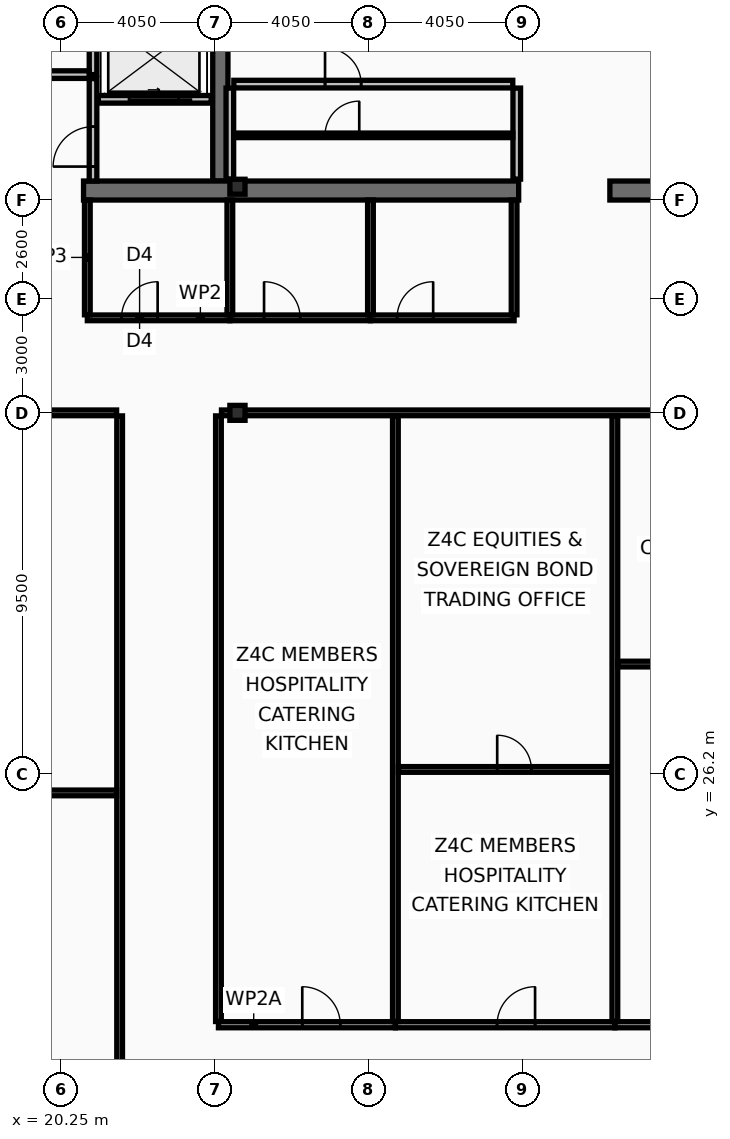
"""IFC4 building model, lengths in metres.
Left out: names, types, materials, properties, quantities, classifications, styles, units other than length and angle.
Written with IfcOpenShell. Run it as: python <this file> out.ifc"""

import sys

from ifc_helpers import new_model, si_unit, direction, frame, frame_2d, origin, origin_2d, place, context, subcontext, project, spatial, rectangle, i_section, extrude, element, fill, save


model = new_model("IFC4")
c1 = context("Model", 3, precision=1e-05, world=origin(), true_north=direction((0.0, 1.0)))
c2 = subcontext(c1, "Body", "Model", "MODEL_VIEW")
j1 = project(units=[si_unit("LENGTHUNIT", "METRE"), si_unit("PLANEANGLEUNIT", "RADIAN")], contexts=[c1])
p1 = place(None, origin())
s1 = spatial("IfcSite", under=j1, at=p1, CompositionType="ELEMENT")
p2 = place(p1, origin())
s2 = spatial("IfcBuilding", under=s1, at=p2, CompositionType="ELEMENT")
p3 = place(p2, frame((0.0, 0.0, 318.2)))
s3 = spatial("IfcBuildingStorey", under=s2, at=p3, CompositionType="ELEMENT", Elevation=318.2)
p4 = place(p3, frame((24.45, 41.8, 0.0), z_axis=(0.0, 0.0, 1.0), x_axis=(0.0, 1.0, 0.0)))
e1 = element("IfcWall", 1, at=p4, inside=s3, PredefinedType="SHEAR", context=c2, shape_type="SweptSolid", body=[
    extrude(rectangle(XDim=11.4, YDim=0.4, at=frame_2d((5.7, 0.0))), origin(), (0.0, 0.0, 1.0), 3.44),
])
p5 = place(p3, frame((32.3, 41.55, 0.0), z_axis=(0.0, 0.0, 1.0), x_axis=(-1.0, 0.0, 0.0)))
e2 = element("IfcWall", 2, at=p5, inside=s3, PredefinedType="SHEAR", context=c2, shape_type="SweptSolid", body=[
    extrude(rectangle(XDim=11.45, YDim=0.5, at=frame_2d((5.725, 0.0))), origin(), (0.0, 0.0, 1.0), 3.44),
])
p6 = place(p3, frame((38.45, 41.55, 0.0), z_axis=(0.0, 0.0, 1.0), x_axis=(-1.0, 0.0, 0.0)))
e3 = element("IfcWall", 3, at=p6, inside=s3, PredefinedType="SHEAR", context=c2, shape_type="SweptSolid", body=[
    extrude(rectangle(XDim=3.75, YDim=0.5, at=frame_2d((1.875, 0.0))), origin(), (0.0, 0.0, 1.0), 3.44),
])
for number, where, z_axis, x_axis in (
    (4, (24.9, 35.7, 0.0), (0.0, 0.0, 1.0), (1.0, 0.0, 0.0)),
    (5, (24.9, 41.65, 0.0), (0.0, 0.0, 1.0), (1.0, 0.0, 0.0)),
):
    element("IfcColumn", number, at=place(p3, frame(where, z_axis=z_axis, x_axis=x_axis)), inside=s3, PredefinedType="COLUMN", context=c2, shape_type="SweptSolid", body=[
        extrude(i_section(OverallWidth=0.399, OverallDepth=0.393, WebThickness=0.023, FlangeThickness=0.037, at=origin_2d()), origin(), (0.0, 0.0, 1.0), 3.6),
    ])
p7 = place(p3, frame((24.21, 43.95, 0.0), z_axis=(0.0, 0.0, 1.0), x_axis=(-1.0, 0.0, 0.0)))
e6 = element("IfcWall", 6, at=p7, inside=s3, PredefinedType="PARTITIONING", context=c2, shape_type="SweptSolid", body=[
    extrude(rectangle(XDim=2.97, YDim=0.2, at=frame_2d((1.485, 0.0))), origin(), (0.0, 0.0, 1.0), 3.44),
])
p8 = place(p7, frame((0.86, 0.0, 0.0)))
e7 = element("IfcOpeningElement", 7, at=p8, cuts=e6, PredefinedType="OPENING", context=c2, shape_type="SweptSolid", body=[
    extrude(rectangle(XDim=1.3, YDim=2.18, at=frame_2d((0.65, 1.09))), frame((0.0, 0.11, 0.0), z_axis=(0.0, -1.0, 0.0), x_axis=(1.0, 0.0, 0.0)), (0.0, 0.0, 1.0), 0.22),
])
p9 = place(p3, frame((21.1, 44.6, 0.0), z_axis=(0.0, 0.0, 1.0), x_axis=(0.0, 1.0, 0.0)))
e8 = element("IfcWall", 8, at=p9, inside=s3, PredefinedType="PARTITIONING", context=c2, shape_type="SweptSolid", body=[
    extrude(rectangle(XDim=4.3, YDim=0.2, at=frame_2d((2.15, 0.0))), origin(), (0.0, 0.0, 1.0), 3.44),
])
p10 = place(p3, frame((16.7, 44.6, 0.0), z_axis=(0.0, 0.0, 1.0), x_axis=(1.0, 0.0, 0.0)))
e9 = element("IfcWall", 9, at=p10, inside=s3, PredefinedType="PARTITIONING", context=c2, shape_type="SweptSolid", body=[
    extrude(rectangle(XDim=4.3, YDim=0.2, at=frame_2d((2.15, 0.0))), origin(), (0.0, 0.0, 1.0), 3.44),
])
p11 = place(p10, frame((1.25, 0.0, 0.0)))
e10 = element("IfcOpeningElement", 10, at=p11, cuts=e9, PredefinedType="OPENING", context=c2, shape_type="SweptSolid", body=[
    extrude(rectangle(XDim=1.05, YDim=2.15, at=frame_2d((0.525, 1.075))), frame((0.0, 0.11, 0.0), z_axis=(0.0, -1.0, 0.0), x_axis=(1.0, 0.0, 0.0)), (0.0, 0.0, 1.0), 0.22),
])
p12 = place(p3, frame((21.1, 41.8, 0.0), z_axis=(0.0, 0.0, 1.0), x_axis=(0.0, 1.0, 0.0)))
e11 = element("IfcWall", 11, at=p12, inside=s3, PredefinedType="PARTITIONING", context=c2, shape_type="SweptSolid", body=[
    extrude(rectangle(XDim=2.695, YDim=0.2, at=frame_2d((1.348, 0.0))), origin(), (0.0, 0.0, 1.0), 3.44),
])
p13 = place(p12, frame((0.38, 0.0, 0.0)))
e12 = element("IfcOpeningElement", 12, at=p13, cuts=e11, PredefinedType="OPENING", context=c2, shape_type="SweptSolid", body=[
    extrude(rectangle(XDim=1.05, YDim=2.15, at=frame_2d((0.525, 1.075))), frame((0.0, 0.11, 0.0), z_axis=(0.0, -1.0, 0.0), x_axis=(1.0, 0.0, 0.0)), (0.0, 0.0, 1.0), 0.22),
])
for number, where, z_axis, x_axis in (
    (13, (24.7, 41.85, 0.0), (0.0, 0.0, 1.0), (0.0, 1.0, 0.0)),
    (14, (32.25, 41.85, 0.0), (0.0, 0.0, 1.0), (0.0, 1.0, 0.0)),
):
    element("IfcWall", number, at=place(p3, frame(where, z_axis=z_axis, x_axis=x_axis)), inside=s3, PredefinedType="PARTITIONING", context=c2, shape_type="SweptSolid", body=[
        extrude(rectangle(XDim=2.395, YDim=0.2, at=frame_2d((1.198, 0.0))), origin(), (0.0, 0.0, 1.0), 3.44),
    ])
p14 = place(p3, frame((24.805, 43.002, 0.0), z_axis=(0.0, 0.0, 1.0), x_axis=(1.0, 0.0, 0.0)))
e15 = element("IfcWall", 15, at=p14, inside=s3, PredefinedType="PARTITIONING", context=c2, shape_type="SweptSolid", body=[
    extrude(rectangle(XDim=7.34, YDim=0.12, at=frame_2d((3.67, 0.0))), origin(), (0.0, 0.0, 1.0), 3.44),
])
p15 = place(p14, frame((2.4, 0.0, 0.0)))
e16 = element("IfcOpeningElement", 16, at=p15, cuts=e15, PredefinedType="OPENING", context=c2, shape_type="SweptSolid", body=[
    extrude(rectangle(XDim=0.9, YDim=2.05, at=frame_2d((0.45, 1.025))), frame((0.0, 0.07, 0.0), z_axis=(0.0, -1.0, 0.0), x_axis=(1.0, 0.0, 0.0)), (0.0, 0.0, 1.0), 0.14),
])
p16 = place(p3, frame((24.805, 44.35, 0.0), z_axis=(0.0, 0.0, 1.0), x_axis=(1.0, 0.0, 0.0)))
e17 = element("IfcWall", 17, at=p16, inside=s3, PredefinedType="PARTITIONING", context=c2, shape_type="SweptSolid", body=[
    extrude(rectangle(XDim=7.34, YDim=0.2, at=frame_2d((3.67, 0.0))), origin(), (0.0, 0.0, 1.0), 3.44),
])
p17 = place(p16, frame((2.4, 0.0, 0.0)))
e18 = element("IfcOpeningElement", 18, at=p17, cuts=e17, PredefinedType="OPENING", context=c2, shape_type="SweptSolid", body=[
    extrude(rectangle(XDim=0.95, YDim=2.1, at=frame_2d((0.475, 1.05))), frame((0.0, 0.11, 0.0), z_axis=(0.0, -1.0, 0.0), x_axis=(1.0, 0.0, 0.0)), (0.0, 0.0, 1.0), 0.22),
])
p18 = place(p3, frame((20.95, 38.2, 0.0), z_axis=(0.0, 0.0, 1.0), x_axis=(1.0, 0.0, 0.0)))
e19 = element("IfcWall", 19, at=p18, inside=s3, PredefinedType="PARTITIONING", context=c2, shape_type="SweptSolid", body=[
    extrude(rectangle(XDim=3.75, YDim=0.15, at=frame_2d((1.875, 0.0))), origin(), (0.0, 0.0, 1.0), 2.83),
])
p19 = place(p18, frame((0.9, 0.0, 0.0)))
e20 = element("IfcOpeningElement", 20, at=p19, cuts=e19, PredefinedType="OPENING", context=c2, shape_type="SweptSolid", body=[
    extrude(rectangle(XDim=0.95, YDim=2.05, at=frame_2d((0.475, 1.025))), frame((0.0, 0.085, 0.0), z_axis=(0.0, -1.0, 0.0), x_axis=(1.0, 0.0, 0.0)), (0.0, 0.0, 1.0), 0.17),
])
p20 = place(p3, frame((24.7, 38.2, 0.0), z_axis=(0.0, 0.0, 1.0), x_axis=(1.0, 0.0, 0.0)))
e21 = element("IfcWall", 21, at=p20, inside=s3, PredefinedType="PARTITIONING", context=c2, shape_type="SweptSolid", body=[
    extrude(rectangle(XDim=3.7, YDim=0.15, at=frame_2d((1.85, 0.0))), origin(), (0.0, 0.0, 1.0), 2.83),
])
p21 = place(p20, frame((0.9, 0.0, 0.0)))
e22 = element("IfcOpeningElement", 22, at=p21, cuts=e21, PredefinedType="OPENING", context=c2, shape_type="SweptSolid", body=[
    extrude(rectangle(XDim=0.95, YDim=2.05, at=frame_2d((0.475, 1.025))), frame((0.0, 0.085, 0.0), z_axis=(0.0, -1.0, 0.0), x_axis=(1.0, 0.0, 0.0)), (0.0, 0.0, 1.0), 0.17),
])
p22 = place(p3, frame((28.4, 38.2, 0.0), z_axis=(0.0, 0.0, 1.0), x_axis=(1.0, 0.0, 0.0)))
e23 = element("IfcWall", 23, at=p22, inside=s3, PredefinedType="PARTITIONING", context=c2, shape_type="SweptSolid", body=[
    extrude(rectangle(XDim=3.78, YDim=0.15, at=frame_2d((1.89, 0.0))), origin(), (0.0, 0.0, 1.0), 3.44),
])
p23 = place(p22, frame((0.7, 0.0, 0.0)))
e24 = element("IfcOpeningElement", 24, at=p23, cuts=e23, PredefinedType="OPENING", context=c2, shape_type="SweptSolid", body=[
    extrude(rectangle(XDim=0.95, YDim=2.05, at=frame_2d((0.475, 1.025))), frame((0.0, 0.085, 0.0), z_axis=(0.0, -1.0, 0.0), x_axis=(1.0, 0.0, 0.0)), (0.0, 0.0, 1.0), 0.17),
])
p24 = place(p3, frame((20.95, 38.28, 0.0), z_axis=(0.0, 0.0, 1.0), x_axis=(0.0, 1.0, 0.0)))
e25 = element("IfcWall", 25, at=p24, inside=s3, PredefinedType="PARTITIONING", context=c2, shape_type="SweptSolid", body=[
    extrude(rectangle(XDim=3.02, YDim=0.15, at=frame_2d((1.51, 0.0))), origin(), (0.0, 0.0, 1.0), 3.44),
])
p25 = place(p3, frame((24.7, 38.28, 0.0), z_axis=(0.0, 0.0, 1.0), x_axis=(0.0, 1.0, 0.0)))
e26 = element("IfcWall", 26, at=p25, inside=s3, PredefinedType="PARTITIONING", context=c2, shape_type="SweptSolid", body=[
    extrude(rectangle(XDim=3.02, YDim=0.15, at=frame_2d((1.51, 0.0))), origin(), (0.0, 0.0, 1.0), 2.83),
])
for number, where, z_axis, x_axis in (
    (27, (28.4, 38.28, 0.0), (0.0, 0.0, 1.0), (0.0, 1.0, 0.0)),
    (28, (32.18, 38.28, 0.0), (0.0, 0.0, 1.0), (0.0, 1.0, 0.0)),
):
    element("IfcWall", number, at=place(p3, frame(where, z_axis=z_axis, x_axis=x_axis)), inside=s3, PredefinedType="PARTITIONING", context=c2, shape_type="SweptSolid", body=[
        extrude(rectangle(XDim=3.02, YDim=0.15, at=frame_2d((1.51, 0.0))), origin(), (0.0, 0.0, 1.0), 3.44),
    ])
p26 = place(p3, frame((21.8, 10.665, 0.0), z_axis=(0.0, 0.0, 1.0), x_axis=(0.0, 1.0, 0.0)))
e29 = element("IfcWall", 29, at=p26, inside=s3, PredefinedType="PARTITIONING", context=c2, shape_type="SweptSolid", body=[
    extrude(rectangle(XDim=24.955, YDim=0.15, at=frame_2d((12.478, 0.0))), origin(), (0.0, 0.0, 1.0), 3.07),
])
p27 = place(p26, frame((4.2, 0.0, 0.0)))
e30 = element("IfcOpeningElement", 30, at=p27, cuts=e29, PredefinedType="OPENING", context=c2, shape_type="SweptSolid", body=[
    extrude(rectangle(XDim=1.1, YDim=2.1, at=frame_2d((0.55, 1.05))), frame((0.0, 0.085, 0.0), z_axis=(0.0, -1.0, 0.0), x_axis=(1.0, 0.0, 0.0)), (0.0, 0.0, 1.0), 0.17),
])
p28 = place(p3, frame((12.095, 35.7, 0.0), z_axis=(0.0, 0.0, 1.0), x_axis=(1.0, 0.0, 0.0)))
e31 = element("IfcWall", 31, at=p28, inside=s3, PredefinedType="PARTITIONING", context=c2, shape_type="SweptSolid", body=[
    extrude(rectangle(XDim=9.625, YDim=0.15, at=frame_2d((4.812, 0.0))), origin(), (0.0, 0.0, 1.0), 2.83),
])
p29 = place(p28, frame((2.8, 0.0, 0.0)))
e32 = element("IfcOpeningElement", 32, at=p29, cuts=e31, PredefinedType="OPENING", context=c2, shape_type="SweptSolid", body=[
    extrude(rectangle(XDim=1.0, YDim=2.05, at=frame_2d((0.5, 1.025))), frame((0.0, 0.085, 0.0), z_axis=(0.0, -1.0, 0.0), x_axis=(1.0, 0.0, 0.0)), (0.0, 0.0, 1.0), 0.17),
])
p30 = place(p3, frame((12.095, 25.7, 0.0), z_axis=(0.0, 0.0, 1.0), x_axis=(1.0, 0.0, 0.0)))
e33 = element("IfcWall", 33, at=p30, inside=s3, PredefinedType="PARTITIONING", context=c2, shape_type="SweptSolid", body=[
    extrude(rectangle(XDim=9.625, YDim=0.15, at=frame_2d((4.812, 0.0))), origin(), (0.0, 0.0, 1.0), 2.83),
])
p31 = place(p30, frame((2.2, 0.0, 0.0)))
e34 = element("IfcOpeningElement", 34, at=p31, cuts=e33, PredefinedType="OPENING", context=c2, shape_type="SweptSolid", body=[
    extrude(rectangle(XDim=0.9, YDim=2.05, at=frame_2d((0.45, 1.025))), frame((0.0, 0.085, 0.0), z_axis=(0.0, -1.0, 0.0), x_axis=(1.0, 0.0, 0.0)), (0.0, 0.0, 1.0), 0.17),
])
p32 = place(p3, frame((24.4, 19.685, 0.0), z_axis=(0.0, 0.0, 1.0), x_axis=(0.0, 1.0, 0.0)))
e35 = element("IfcWall", 35, at=p32, inside=s3, PredefinedType="PARTITIONING", context=c2, shape_type="SweptSolid", body=[
    extrude(rectangle(XDim=15.935, YDim=0.15, at=frame_2d((7.968, 0.0))), origin(), (0.0, 0.0, 1.0), 2.83),
])
p33 = place(p3, frame((24.48, 35.7, 0.0), z_axis=(0.0, 0.0, 1.0), x_axis=(1.0, 0.0, 0.0)))
e36 = element("IfcWall", 36, at=p33, inside=s3, PredefinedType="PARTITIONING", context=c2, shape_type="SweptSolid", body=[
    extrude(rectangle(XDim=25.02, YDim=0.15, at=frame_2d((12.51, 0.0))), origin(), (0.0, 0.0, 1.0), 2.83),
])
p34 = place(p3, frame((24.4, 19.6, 0.0), z_axis=(0.0, 0.0, 1.0), x_axis=(1.0, 0.0, 0.0)))
e37 = element("IfcWall", 37, at=p34, inside=s3, PredefinedType="PARTITIONING", context=c2, shape_type="SweptSolid", body=[
    extrude(rectangle(XDim=4.656, YDim=0.16, at=frame_2d((2.328, 0.0))), origin(), (0.0, 0.0, 1.0), 2.83),
])
p35 = place(p34, frame((2.206, 0.0, 0.0)))
e38 = element("IfcOpeningElement", 38, at=p35, cuts=e37, PredefinedType="OPENING", context=c2, shape_type="SweptSolid", body=[
    extrude(rectangle(XDim=1.0, YDim=2.05, at=frame_2d((0.5, 1.025))), frame((0.0, 0.09, 0.0), z_axis=(0.0, -1.0, 0.0), x_axis=(1.0, 0.0, 0.0)), (0.0, 0.0, 1.0), 0.18),
])
p36 = place(p3, frame((29.056, 19.6, 0.0), z_axis=(0.0, 0.0, 1.0), x_axis=(1.0, 0.0, 0.0)))
e39 = element("IfcWall", 39, at=p36, inside=s3, PredefinedType="PARTITIONING", context=c2, shape_type="SweptSolid", body=[
    extrude(rectangle(XDim=5.775, YDim=0.16, at=frame_2d((2.888, 0.0))), origin(), (0.0, 0.0, 1.0), 3.44),
])
p37 = place(p36, frame((2.676, 0.0, 0.0)))
e40 = element("IfcOpeningElement", 40, at=p37, cuts=e39, PredefinedType="OPENING", context=c2, shape_type="SweptSolid", body=[
    extrude(rectangle(XDim=1.0, YDim=2.05, at=frame_2d((0.5, 1.025))), frame((0.0, 0.09, 0.0), z_axis=(0.0, -1.0, 0.0), x_axis=(1.0, 0.0, 0.0)), (0.0, 0.0, 1.0), 0.18),
])
p38 = place(p3, frame((29.056, 19.685, 0.0), z_axis=(0.0, 0.0, 1.0), x_axis=(0.0, 1.0, 0.0)))
e41 = element("IfcWall", 41, at=p38, inside=s3, PredefinedType="PARTITIONING", context=c2, shape_type="SweptSolid", body=[
    extrude(rectangle(XDim=15.935, YDim=0.15, at=frame_2d((7.968, 0.0))), origin(), (0.0, 0.0, 1.0), 3.07),
])
p39 = place(p3, frame((29.136, 26.317, 0.0), z_axis=(0.0, 0.0, 1.0), x_axis=(1.0, 0.0, 0.0)))
e42 = element("IfcWall", 42, at=p39, inside=s3, PredefinedType="PARTITIONING", context=c2, shape_type="SweptSolid", body=[
    extrude(rectangle(XDim=5.615, YDim=0.15, at=frame_2d((2.808, 0.0))), origin(), (0.0, 0.0, 1.0), 3.44),
])
p40 = place(p39, frame((2.599, 0.0, 0.0)))
e43 = element("IfcOpeningElement", 43, at=p40, cuts=e42, PredefinedType="OPENING", context=c2, shape_type="SweptSolid", body=[
    extrude(rectangle(XDim=0.9, YDim=2.05, at=frame_2d((0.45, 1.025))), frame((0.0, 0.085, 0.0), z_axis=(0.0, -1.0, 0.0), x_axis=(1.0, 0.0, 0.0)), (0.0, 0.0, 1.0), 0.17),
])
p41 = place(p3, frame((34.832, 19.6, 0.0), z_axis=(0.0, 0.0, 1.0), x_axis=(1.0, 0.0, 0.0)))
e44 = element("IfcWall", 44, at=p41, inside=s3, PredefinedType="PARTITIONING", context=c2, shape_type="SweptSolid", body=[
    extrude(rectangle(XDim=7.818, YDim=0.16, at=frame_2d((3.909, 0.0))), origin(), (0.0, 0.0, 1.0), 3.44),
])
p42 = place(p41, frame((3.534, 0.0, 0.0)))
e45 = element("IfcOpeningElement", 45, at=p42, cuts=e44, PredefinedType="OPENING", context=c2, shape_type="SweptSolid", body=[
    extrude(rectangle(XDim=1.0, YDim=2.05, at=frame_2d((0.5, 1.025))), frame((0.0, 0.09, 0.0), z_axis=(0.0, -1.0, 0.0), x_axis=(1.0, 0.0, 0.0)), (0.0, 0.0, 1.0), 0.18),
])
p43 = place(p3, frame((34.832, 19.685, 0.0), z_axis=(0.0, 0.0, 1.0), x_axis=(0.0, 1.0, 0.0)))
e46 = element("IfcWall", 46, at=p43, inside=s3, PredefinedType="PARTITIONING", context=c2, shape_type="SweptSolid", body=[
    extrude(rectangle(XDim=15.935, YDim=0.15, at=frame_2d((7.968, 0.0))), origin(), (0.0, 0.0, 1.0), 3.07),
])
p44 = place(p3, frame((34.912, 29.09, 0.0), z_axis=(0.0, 0.0, 1.0), x_axis=(1.0, 0.0, 0.0)))
e47 = element("IfcWall", 47, at=p44, inside=s3, PredefinedType="PARTITIONING", context=c2, shape_type="SweptSolid", body=[
    extrude(rectangle(XDim=7.658, YDim=0.15, at=frame_2d((3.829, 0.0))), origin(), (0.0, 0.0, 1.0), 3.44),
])
p45 = place(p44, frame((3.518, 0.0, 0.0)))
e48 = element("IfcOpeningElement", 48, at=p45, cuts=e47, PredefinedType="OPENING", context=c2, shape_type="SweptSolid", body=[
    extrude(rectangle(XDim=0.9, YDim=2.05, at=frame_2d((0.45, 1.025))), frame((0.0, 0.085, 0.0), z_axis=(0.0, -1.0, 0.0), x_axis=(1.0, 0.0, 0.0)), (0.0, 0.0, 1.0), 0.17),
])
p46 = place(p8, origin())
e49 = element("IfcDoor", 49, at=p46, inside=s3, OperationType="SLIDING_TO_LEFT", PredefinedType="DOOR", context=c2, shape_type="SweptSolid", body=[
    extrude(rectangle(XDim=1.3, YDim=2.18, at=frame_2d((0.65, 1.09))), frame((0.0, 0.025, 0.0), z_axis=(0.0, -1.0, 0.0), x_axis=(1.0, 0.0, 0.0)), (0.0, 0.0, 1.0), 0.05),
])
fill(e7, e49)
p47 = place(p13, origin())
e50 = element("IfcDoor", 50, at=p47, inside=s3, OperationType="SINGLE_SWING_LEFT", PredefinedType="DOOR", context=c2, shape_type="SweptSolid", body=[
    extrude(rectangle(XDim=1.05, YDim=2.15, at=frame_2d((0.525, 1.075))), frame((0.0, 0.025, 0.0), z_axis=(0.0, -1.0, 0.0), x_axis=(1.0, 0.0, 0.0)), (0.0, 0.0, 1.0), 0.05),
])
fill(e12, e50)
p48 = place(p15, origin())
e51 = element("IfcDoor", 51, at=p48, inside=s3, OperationType="SINGLE_SWING_RIGHT", PredefinedType="DOOR", context=c2, shape_type="SweptSolid", body=[
    extrude(rectangle(XDim=0.9, YDim=2.05, at=frame_2d((0.45, 1.025))), frame((0.0, 0.025, 0.0), z_axis=(0.0, -1.0, 0.0), x_axis=(1.0, 0.0, 0.0)), (0.0, 0.0, 1.0), 0.05),
])
fill(e16, e51)
p49 = place(p17, origin())
e52 = element("IfcDoor", 52, at=p49, inside=s3, OperationType="SINGLE_SWING_LEFT", PredefinedType="DOOR", context=c2, shape_type="SweptSolid", body=[
    extrude(rectangle(XDim=0.95, YDim=2.1, at=frame_2d((0.475, 1.05))), frame((0.0, 0.025, 0.0), z_axis=(0.0, -1.0, 0.0), x_axis=(1.0, 0.0, 0.0)), (0.0, 0.0, 1.0), 0.05),
])
fill(e18, e52)
p50 = place(p19, origin())
e53 = element("IfcDoor", 53, at=p50, inside=s3, OperationType="SINGLE_SWING_RIGHT", PredefinedType="DOOR", context=c2, shape_type="SweptSolid", body=[
    extrude(rectangle(XDim=0.95, YDim=2.05, at=frame_2d((0.475, 1.025))), frame((0.0, 0.025, 0.0), z_axis=(0.0, -1.0, 0.0), x_axis=(1.0, 0.0, 0.0)), (0.0, 0.0, 1.0), 0.05),
])
fill(e20, e53)
p51 = place(p21, origin())
e54 = element("IfcDoor", 54, at=p51, inside=s3, OperationType="SINGLE_SWING_LEFT", PredefinedType="DOOR", context=c2, shape_type="SweptSolid", body=[
    extrude(rectangle(XDim=0.95, YDim=2.05, at=frame_2d((0.475, 1.025))), frame((0.0, 0.025, 0.0), z_axis=(0.0, -1.0, 0.0), x_axis=(1.0, 0.0, 0.0)), (0.0, 0.0, 1.0), 0.05),
])
fill(e22, e54)
p52 = place(p23, origin())
e55 = element("IfcDoor", 55, at=p52, inside=s3, OperationType="SINGLE_SWING_RIGHT", PredefinedType="DOOR", context=c2, shape_type="SweptSolid", body=[
    extrude(rectangle(XDim=0.95, YDim=2.05, at=frame_2d((0.475, 1.025))), frame((0.0, 0.025, 0.0), z_axis=(0.0, -1.0, 0.0), x_axis=(1.0, 0.0, 0.0)), (0.0, 0.0, 1.0), 0.05),
])
fill(e24, e55)
p53 = place(p35, origin())
e56 = element("IfcDoor", 56, at=p53, inside=s3, OperationType="SINGLE_SWING_LEFT", PredefinedType="DOOR", context=c2, shape_type="SweptSolid", body=[
    extrude(rectangle(XDim=1.0, YDim=2.05, at=frame_2d((0.5, 1.025))), frame((0.0, 0.025, 0.0), z_axis=(0.0, -1.0, 0.0), x_axis=(1.0, 0.0, 0.0)), (0.0, 0.0, 1.0), 0.05),
])
fill(e38, e56)
p54 = place(p37, origin())
e57 = element("IfcDoor", 57, at=p54, inside=s3, OperationType="SINGLE_SWING_RIGHT", PredefinedType="DOOR", context=c2, shape_type="SweptSolid", body=[
    extrude(rectangle(XDim=1.0, YDim=2.05, at=frame_2d((0.5, 1.025))), frame((0.0, 0.025, 0.0), z_axis=(0.0, -1.0, 0.0), x_axis=(1.0, 0.0, 0.0)), (0.0, 0.0, 1.0), 0.05),
])
fill(e40, e57)
p55 = place(p40, origin())
e58 = element("IfcDoor", 58, at=p55, inside=s3, OperationType="SINGLE_SWING_LEFT", PredefinedType="DOOR", context=c2, shape_type="SweptSolid", body=[
    extrude(rectangle(XDim=0.9, YDim=2.05, at=frame_2d((0.45, 1.025))), frame((0.0, 0.025, 0.0), z_axis=(0.0, -1.0, 0.0), x_axis=(1.0, 0.0, 0.0)), (0.0, 0.0, 1.0), 0.05),
])
fill(e43, e58)
save(model, sys.argv[1])
